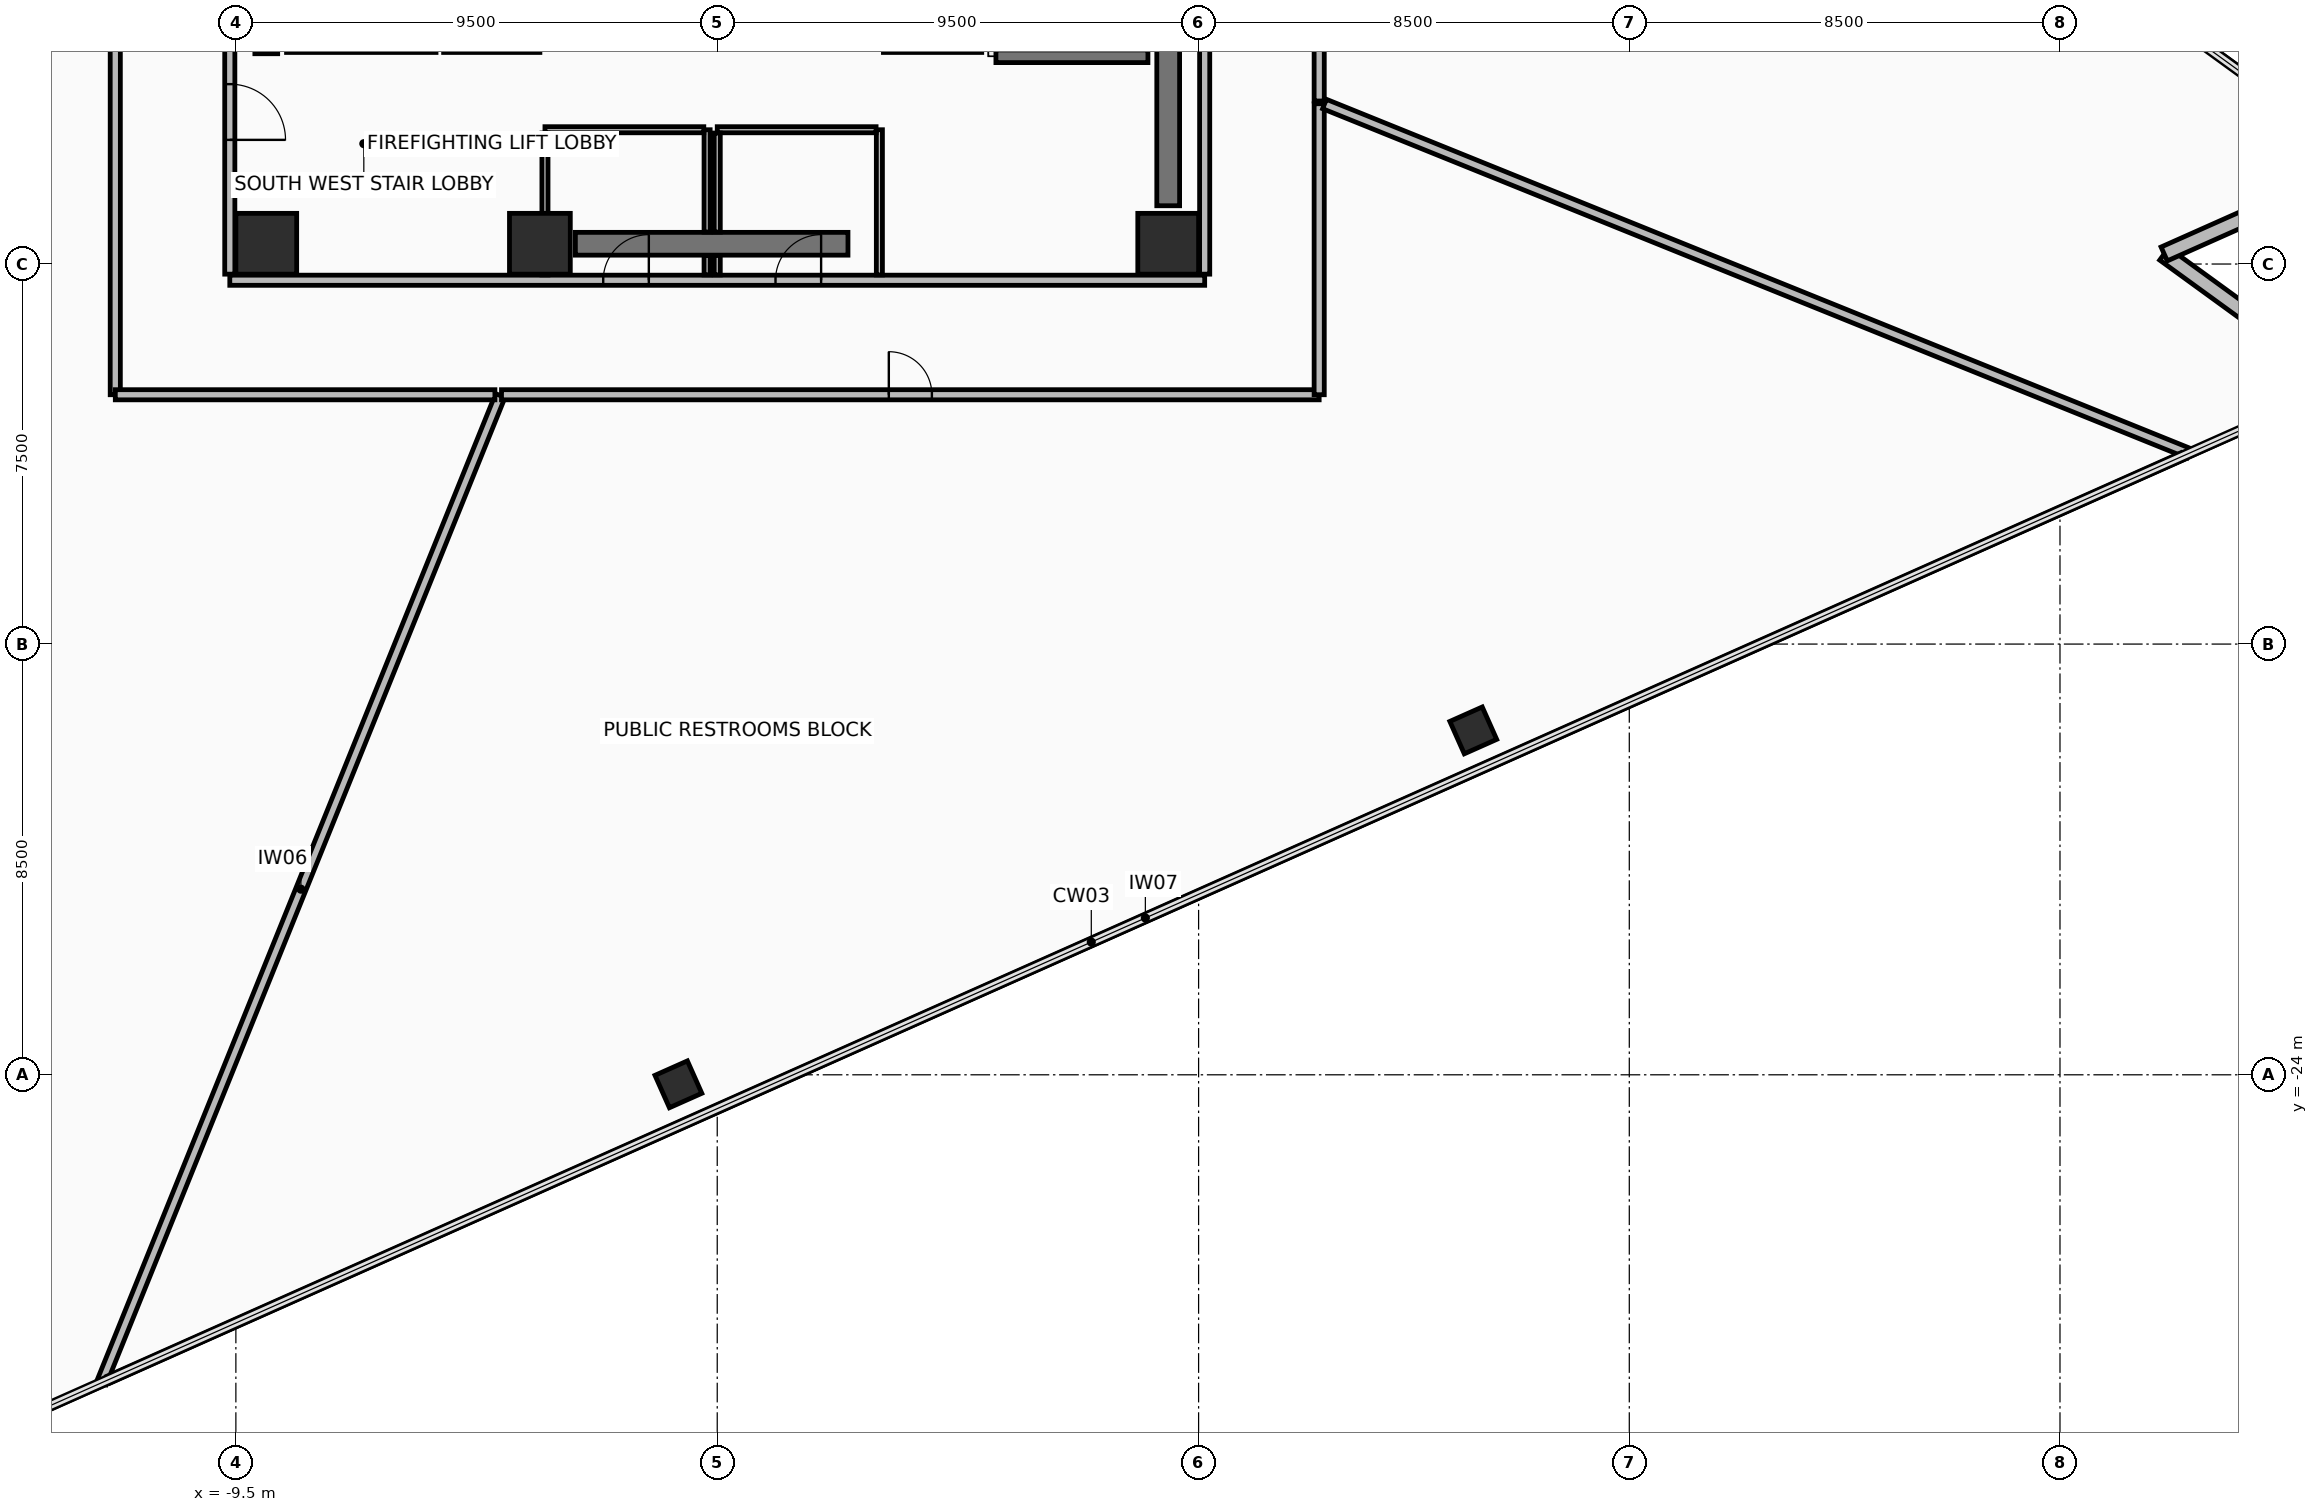
"""IFC4 building model, lengths in metres.
Left out: names, types, materials, properties, quantities, classifications, styles, units other than length and angle.
Written with IfcOpenShell. Run it as: python <this file> out.ifc"""

import sys

from ifc_helpers import new_model, si_unit, direction, frame, frame_2d, origin, origin_2d, place, context, subcontext, project, spatial, rectangle, hollow_rectangle, extrude, element, fill, save


model = new_model("IFC4")
c1 = context("Model", 3, precision=1e-05, world=origin(), true_north=direction((0.0, 1.0)))
c2 = subcontext(c1, "Body", "Model", "MODEL_VIEW")
j1 = project(units=[si_unit("LENGTHUNIT", "METRE"), si_unit("PLANEANGLEUNIT", "RADIAN")], contexts=[c1])
p1 = place(None, origin())
s1 = spatial("IfcSite", under=j1, at=p1, CompositionType="ELEMENT")
p2 = place(p1, origin())
s2 = spatial("IfcBuilding", under=s1, at=p2, CompositionType="ELEMENT")
p3 = place(p2, frame((0.0, 0.0, 134.05)))
s3 = spatial("IfcBuildingStorey", under=s2, at=p3, CompositionType="ELEMENT", Elevation=134.05)
for number, where, z_axis, x_axis in (
    (1, (-8.9, -7.6, 0.0), (0.0, 0.0, 1.0), (1.0, 0.0, 0.0)),
    (2, (-3.5, -7.6, 0.0), (0.0, 0.0, 1.0), (1.0, 0.0, 0.0)),
    (3, (8.9, -7.6, 0.0), (0.0, 0.0, 1.0), (1.0, 0.0, 0.0)),
):
    element("IfcColumn", number, at=place(p3, frame(where, z_axis=z_axis, x_axis=x_axis)), inside=s3, PredefinedType="COLUMN", context=c2, shape_type="SweptSolid", body=[
        extrude(rectangle(XDim=1.2, YDim=1.2, at=origin_2d()), origin(), (0.0, 0.0, 1.0), 4.75),
    ])
for number, where, z_axis, x_axis in (
    (4, (-0.766, -24.188, 0.0), (0.0, 0.0, 1.0), (0.914, 0.407, 0.0)),
    (5, (14.921, -17.204, 0.0), (0.0, 0.0, 1.0), (0.914, 0.407, 0.0)),
):
    element("IfcColumn", number, at=place(p3, frame(where, z_axis=z_axis, x_axis=x_axis)), inside=s3, PredefinedType="COLUMN", context=c2, shape_type="SweptSolid", body=[
        extrude(hollow_rectangle(XDim=0.7, YDim=0.7, WallThickness=0.04, at=origin_2d()), origin(), (0.0, 0.0, 1.0), 4.75),
    ])
for number, where, z_axis, x_axis in (
    (6, (32.1, -10.376, 0.0), (0.0, 0.0, 1.0), (-0.809, 0.588, 0.0)),
    (7, (28.556, -7.802, 0.0), (0.0, 0.0, 1.0), (0.914, 0.407, 0.0)),
):
    element("IfcWall", number, at=place(p3, frame(where, z_axis=z_axis, x_axis=x_axis)), inside=s3, PredefinedType="STANDARD", context=c2, shape_type="SweptSolid", body=[
        extrude(rectangle(XDim=4.38, YDim=0.3, at=frame_2d((2.19, 0.0))), origin(), (0.0, 0.0, 1.0), 2.255),
    ])
p4 = place(p3, frame((-2.8, -7.6, 0.0), z_axis=(0.0, 0.0, 1.0), x_axis=(1.0, 0.0, 0.0)))
e8 = element("IfcWall", 8, at=p4, inside=s3, PredefinedType="SHEAR", context=c2, shape_type="SweptSolid", body=[
    extrude(rectangle(XDim=5.38, YDim=0.45, at=frame_2d((2.69, 0.0))), origin(), (0.0, 0.0, 1.0), 4.56),
])
for number, where, z_axis, x_axis in (
    (9, (-8.9, -3.85, 0.0), (0.0, 0.0, 1.0), (0.0, 1.0, 0.0)),
    (10, (8.9, -6.85, 0.0), (0.0, 0.0, 1.0), (0.0, 1.0, 0.0)),
):
    element("IfcWall", number, at=place(p3, frame(where, z_axis=z_axis, x_axis=x_axis)), inside=s3, PredefinedType="SHEAR", context=c2, shape_type="SweptSolid", body=[
        extrude(rectangle(XDim=10.7, YDim=0.45, at=frame_2d((5.35, 0.0))), origin(), (0.0, 0.0, 1.0), 4.56),
    ])
p5 = place(p3, frame((-9.62, -8.32, 0.0), z_axis=(0.0, 0.0, 1.0), x_axis=(1.0, 0.0, 0.0)))
e11 = element("IfcWall", 11, at=p5, inside=s3, PredefinedType="PARTITIONING", context=c2, shape_type="SweptSolid", body=[
    extrude(rectangle(XDim=19.24, YDim=0.2, at=frame_2d((9.62, 0.0))), origin(), (0.0, 0.0, 1.0), 2.355),
])
p6 = place(p5, frame((7.37, 0.0, 0.0)))
e12 = element("IfcOpeningElement", 12, at=p6, cuts=e11, PredefinedType="OPENING", context=c2, shape_type="SweptSolid", body=[
    extrude(rectangle(XDim=0.9, YDim=2.1, at=frame_2d((0.45, 1.05))), frame((0.0, 0.11, 0.0), z_axis=(0.0, -1.0, 0.0), x_axis=(1.0, 0.0, 0.0)), (0.0, 0.0, 1.0), 0.22),
])
p7 = place(p5, frame((10.77, 0.0, 0.0)))
e13 = element("IfcOpeningElement", 13, at=p7, cuts=e11, PredefinedType="OPENING", context=c2, shape_type="SweptSolid", body=[
    extrude(rectangle(XDim=0.9, YDim=2.1, at=frame_2d((0.45, 1.05))), frame((0.0, 0.11, 0.0), z_axis=(0.0, -1.0, 0.0), x_axis=(1.0, 0.0, 0.0)), (0.0, 0.0, 1.0), 0.22),
])
p8 = place(p3, frame((-9.62, 8.2, 0.0), z_axis=(0.0, 0.0, 1.0), x_axis=(0.0, -1.0, 0.0)))
e14 = element("IfcWall", 14, at=p8, inside=s3, PredefinedType="PARTITIONING", context=c2, shape_type="SweptSolid", body=[
    extrude(rectangle(XDim=16.4, YDim=0.2, at=frame_2d((8.2, 0.0))), origin(), (0.0, 0.0, 1.0), 2.755),
])
p9 = place(p8, frame((12.65, 0.0, 0.0)))
e15 = element("IfcOpeningElement", 15, at=p9, cuts=e14, PredefinedType="OPENING", context=c2, shape_type="SweptSolid", body=[
    extrude(rectangle(XDim=1.1, YDim=2.15, at=frame_2d((0.55, 1.075))), frame((0.0, 0.11, 0.0), z_axis=(0.0, -1.0, 0.0), x_axis=(1.0, 0.0, 0.0)), (0.0, 0.0, 1.0), 0.22),
])
p10 = place(p3, frame((9.62, -8.2, 0.0), z_axis=(0.0, 0.0, 1.0), x_axis=(0.0, 1.0, 0.0)))
e16 = element("IfcWall", 16, at=p10, inside=s3, PredefinedType="PARTITIONING", context=c2, shape_type="SweptSolid", body=[
    extrude(rectangle(XDim=16.4, YDim=0.2, at=frame_2d((8.2, 0.0))), origin(), (0.0, 0.0, 1.0), 2.355),
])
p11 = place(p10, frame((12.65, 0.0, 0.0)))
e17 = element("IfcOpeningElement", 17, at=p11, cuts=e16, PredefinedType="OPENING", context=c2, shape_type="SweptSolid", body=[
    extrude(rectangle(XDim=1.1, YDim=2.15, at=frame_2d((0.55, 1.075))), frame((0.0, 0.11, 0.0), z_axis=(0.0, -1.0, 0.0), x_axis=(1.0, 0.0, 0.0)), (0.0, 0.0, 1.0), 0.22),
])
p12 = place(p3, frame((-8.5, -3.7, 0.0), z_axis=(0.0, 0.0, 1.0), x_axis=(1.0, 0.0, 0.0)))
e18 = element("IfcWall", 18, at=p12, inside=s3, PredefinedType="SHEAR", context=c2, shape_type="SweptSolid", body=[
    extrude(rectangle(XDim=2.95, YDim=0.25, at=frame_2d((1.475, 0.0))), origin(), (0.0, 0.0, 1.0), 4.56),
])
p13 = place(p12, frame((0.9, 0.0, 0.0)))
e19 = element("IfcOpeningElement", 19, at=p13, cuts=e18, PredefinedType="OPENING", context=c2, shape_type="SweptSolid", body=[
    extrude(rectangle(XDim=1.1, YDim=2.15, at=frame_2d((0.55, 1.075))), frame((0.0, 0.135, 0.0), z_axis=(0.0, -1.0, 0.0), x_axis=(1.0, 0.0, 0.0)), (0.0, 0.0, 1.0), 0.27),
])
p14 = place(p3, frame((5.5, -3.9, 0.0), z_axis=(0.0, 0.0, 1.0), x_axis=(1.0, 0.0, 0.0)))
e20 = element("IfcWall", 20, at=p14, inside=s3, PredefinedType="SHEAR", context=c2, shape_type="SweptSolid", body=[
    extrude(rectangle(XDim=3.0, YDim=0.25, at=frame_2d((1.5, 0.0))), origin(), (0.0, 0.0, 1.0), 4.56),
])
p15 = place(p3, frame((-5.4, -3.7, 0.0), z_axis=(0.0, 0.0, 1.0), x_axis=(1.0, 0.0, 0.0)))
e21 = element("IfcWall", 21, at=p15, inside=s3, PredefinedType="SHEAR", context=c2, shape_type="SweptSolid", body=[
    extrude(rectangle(XDim=1.9, YDim=0.25, at=frame_2d((0.95, 0.0))), origin(), (0.0, 0.0, 1.0), 4.56),
])
p16 = place(p15, frame((0.35, 0.0, 0.0)))
e22 = element("IfcOpeningElement", 22, at=p16, cuts=e21, PredefinedType="OPENING", context=c2, shape_type="SweptSolid", body=[
    extrude(rectangle(XDim=1.2, YDim=2.2, at=frame_2d((0.6, 1.1))), frame((0.0, 0.135, 0.0), z_axis=(0.0, -1.0, 0.0), x_axis=(1.0, 0.0, 0.0)), (0.0, 0.0, 1.0), 0.27),
])
p17 = place(p3, frame((3.28, -3.7, 0.0), z_axis=(0.0, 0.0, 1.0), x_axis=(1.0, 0.0, 0.0)))
e23 = element("IfcWall", 23, at=p17, inside=s3, PredefinedType="SHEAR", context=c2, shape_type="SweptSolid", body=[
    extrude(rectangle(XDim=1.94, YDim=0.25, at=frame_2d((0.97, 0.0))), origin(), (0.0, 0.0, 1.0), 4.56),
])
p18 = place(p17, frame((0.42, 0.0, 0.0)))
e24 = element("IfcOpeningElement", 24, at=p18, cuts=e23, PredefinedType="OPENING", context=c2, shape_type="SweptSolid", body=[
    extrude(rectangle(XDim=1.1, YDim=2.2, at=frame_2d((0.55, 1.1))), frame((0.0, 0.135, 0.0), z_axis=(0.0, -1.0, 0.0), x_axis=(1.0, 0.0, 0.0)), (0.0, 0.0, 1.0), 0.27),
])
p19 = place(p3, frame((-0.2, -8.215, 0.0), z_axis=(0.0, 0.0, 1.0), x_axis=(0.0, 1.0, 0.0)))
e25 = element("IfcWall", 25, at=p19, inside=s3, PredefinedType="PARTITIONING", context=c2, shape_type="SweptSolid", body=[
    extrude(rectangle(XDim=0.385, YDim=0.12, at=frame_2d((0.192, 0.0))), origin(), (0.0, 0.0, 1.0), 3.755),
])
p20 = place(p3, frame((-0.2, -7.37, 0.0), z_axis=(0.0, 0.0, 1.0), x_axis=(0.0, 1.0, 0.0)))
e26 = element("IfcWall", 26, at=p20, inside=s3, PredefinedType="PARTITIONING", context=c2, shape_type="SweptSolid", body=[
    extrude(rectangle(XDim=2.02, YDim=0.12, at=frame_2d((1.01, 0.0))), origin(), (0.0, 0.0, 1.0), 3.755),
])
p21 = place(p3, frame((-0.265, -5.35, 0.0), z_axis=(0.0, 0.0, 1.0), x_axis=(-1.0, 0.0, 0.0)))
e27 = element("IfcWall", 27, at=p21, inside=s3, PredefinedType="PARTITIONING", context=c2, shape_type="SweptSolid", body=[
    extrude(rectangle(XDim=3.135, YDim=0.12, at=frame_2d((1.567, 0.0))), origin(), (0.0, 0.0, 1.0), 3.755),
])
p22 = place(p3, frame((-3.4, -5.415, 0.0), z_axis=(0.0, 0.0, 1.0), x_axis=(0.0, -1.0, 0.0)))
e28 = element("IfcWall", 28, at=p22, inside=s3, PredefinedType="PARTITIONING", context=c2, shape_type="SweptSolid", body=[
    extrude(rectangle(XDim=2.8, YDim=0.12, at=frame_2d((1.4, 0.0))), origin(), (0.0, 0.0, 1.0), 2.355),
])
p23 = place(p3, frame((3.2, -8.215, 0.0), z_axis=(0.0, 0.0, 1.0), x_axis=(0.0, 1.0, 0.0)))
e29 = element("IfcWall", 29, at=p23, inside=s3, PredefinedType="PARTITIONING", context=c2, shape_type="SweptSolid", body=[
    extrude(rectangle(XDim=2.865, YDim=0.12, at=frame_2d((1.433, 0.0))), origin(), (0.0, 0.0, 1.0), 3.755),
])
p24 = place(p3, frame((3.135, -5.35, 0.0), z_axis=(0.0, 0.0, 1.0), x_axis=(-1.0, 0.0, 0.0)))
e30 = element("IfcWall", 30, at=p24, inside=s3, PredefinedType="PARTITIONING", context=c2, shape_type="SweptSolid", body=[
    extrude(rectangle(XDim=3.135, YDim=0.12, at=frame_2d((1.567, 0.0))), origin(), (0.0, 0.0, 1.0), 4.56),
])
p25 = place(p3, frame((0.0, -5.415, 0.0), z_axis=(0.0, 0.0, 1.0), x_axis=(0.0, -1.0, 0.0)))
e31 = element("IfcWall", 31, at=p25, inside=s3, PredefinedType="PARTITIONING", context=c2, shape_type="SweptSolid", body=[
    extrude(rectangle(XDim=1.955, YDim=0.12, at=frame_2d((0.978, 0.0))), origin(), (0.0, 0.0, 1.0), 3.755),
])
p26 = place(p3, frame((0.0, -7.83, 0.0), z_axis=(0.0, 0.0, 1.0), x_axis=(0.0, -1.0, 0.0)))
e32 = element("IfcWall", 32, at=p26, inside=s3, PredefinedType="PARTITIONING", context=c2, shape_type="SweptSolid", body=[
    extrude(rectangle(XDim=0.385, YDim=0.12, at=frame_2d((0.192, 0.0))), origin(), (0.0, 0.0, 1.0), 3.755),
])
p27 = place(p3, frame((-12.152, -30.078, 0.0), z_axis=(0.0, 0.0, 1.0), x_axis=(0.374599633096, 0.927186666688, 0.0)))
e33 = element("IfcWall", 33, at=p27, inside=s3, PredefinedType="PARTITIONING", context=c2, shape_type="SweptSolid", body=[
    extrude(rectangle(XDim=21.013, YDim=0.2, at=frame_2d((10.506, 0.0))), origin(), (0.0, 0.0, 1.0), 2.255),
])
p28 = place(p3, frame((-4.258, -10.58, 0.0), z_axis=(0.0, 0.0, 1.0), x_axis=(1.0, 0.0, 0.0)))
e34 = element("IfcWall", 34, at=p28, inside=s3, PredefinedType="PARTITIONING", context=c2, shape_type="SweptSolid", body=[
    extrude(rectangle(XDim=16.137, YDim=0.2, at=frame_2d((8.069, 0.0))), origin(), (0.0, 0.0, 1.0), 2.355),
])
p29 = place(p28, frame((7.644, 0.0, 0.0)))
e35 = element("IfcOpeningElement", 35, at=p29, cuts=e34, PredefinedType="OPENING", context=c2, shape_type="SweptSolid", body=[
    extrude(rectangle(XDim=0.85, YDim=2.1, at=frame_2d((0.425, 1.05))), frame((0.0, 0.11, 0.0), z_axis=(0.0, -1.0, 0.0), x_axis=(1.0, 0.0, 0.0)), (0.0, 0.0, 1.0), 0.22),
])
p30 = place(p3, frame((11.88, -10.579, 0.0), z_axis=(0.0, 0.0, 1.0), x_axis=(0.0, 1.0, 0.0)))
e36 = element("IfcWall", 36, at=p30, inside=s3, PredefinedType="PARTITIONING", context=c2, shape_type="SweptSolid", body=[
    extrude(rectangle(XDim=5.742, YDim=0.2, at=frame_2d((2.871, 0.0))), origin(), (0.0, 0.0, 1.0), 2.355),
])
p31 = place(p3, frame((11.985, -4.842, 0.0), z_axis=(0.0, 0.0, 1.0), x_axis=(0.927179986841, -0.37461616623, 0.0)))
e37 = element("IfcWall", 37, at=p31, inside=s3, PredefinedType="PARTITIONING", context=c2, shape_type="SweptSolid", body=[
    extrude(rectangle(XDim=18.401, YDim=0.2, at=frame_2d((9.2, 0.0))), origin(), (0.0, 0.0, 1.0), 2.255),
])
p32 = place(p3, frame((28.913, -11.795, 0.0), z_axis=(0.0, 0.0, 1.0), x_axis=(-0.913545956469, -0.406735522692, 0.0)))
e38 = element("IfcWall", 38, at=p32, inside=s3, PredefinedType="PARTITIONING", context=c2, shape_type="SweptSolid", body=[
    extrude(rectangle(XDim=44.801, YDim=0.15, at=frame_2d((22.4, 0.0))), origin(), (0.0, 0.0, 1.0), 2.355),
])
p33 = place(p3, frame((-11.88, 4.783, 0.0), z_axis=(0.0, 0.0, 1.0), x_axis=(0.0, -1.0, 0.0)))
e39 = element("IfcWall", 39, at=p33, inside=s3, PredefinedType="PARTITIONING", context=c2, shape_type="SweptSolid", body=[
    extrude(rectangle(XDim=15.362, YDim=0.2, at=frame_2d((7.681, 0.0))), origin(), (0.0, 0.0, 1.0), 2.755),
])
p34 = place(p33, frame((7.181, 0.0, 0.0)))
e40 = element("IfcOpeningElement", 40, at=p34, cuts=e39, PredefinedType="OPENING", context=c2, shape_type="SweptSolid", body=[
    extrude(rectangle(XDim=1.0, YDim=2.15, at=frame_2d((0.5, 1.075))), frame((0.0, 0.11, 0.0), z_axis=(0.0, -1.0, 0.0), x_axis=(1.0, 0.0, 0.0)), (0.0, 0.0, 1.0), 0.22),
])
p35 = place(p3, frame((-11.879, -10.58, 0.0), z_axis=(0.0, 0.0, 1.0), x_axis=(1.0, 0.0, 0.0)))
e41 = element("IfcWall", 41, at=p35, inside=s3, PredefinedType="PARTITIONING", context=c2, shape_type="SweptSolid", body=[
    extrude(rectangle(XDim=7.492, YDim=0.2, at=frame_2d((3.746, 0.0))), origin(), (0.0, 0.0, 1.0), 2.355),
])
p36 = place(p3, frame((11.88, -4.783, 0.0), z_axis=(0.0, 0.0, 1.0), x_axis=(0.0, 1.0, 0.0)))
e42 = element("IfcWall", 42, at=p36, inside=s3, PredefinedType="PARTITIONING", context=c2, shape_type="SweptSolid", body=[
    extrude(rectangle(XDim=13.786, YDim=0.2, at=frame_2d((6.893, 0.0))), origin(), (0.0, 0.0, 1.0), 2.255),
])
p37 = place(p36, frame((6.443, 0.0, 0.0)))
e43 = element("IfcOpeningElement", 43, at=p37, cuts=e42, PredefinedType="OPENING", context=c2, shape_type="SweptSolid", body=[
    extrude(rectangle(XDim=0.9, YDim=2.1, at=frame_2d((0.45, 1.05))), frame((0.0, 0.11, 0.0), z_axis=(0.0, -1.0, 0.0), x_axis=(1.0, 0.0, 0.0)), (0.0, 0.0, 1.0), 0.22),
])
p38 = place(p9, frame((1.1, 0.0, 0.0), z_axis=(0.0, 0.0, 1.0), x_axis=(-1.0, 0.0, 0.0)))
e44 = element("IfcDoor", 44, at=p38, inside=s3, OperationType="SINGLE_SWING_LEFT", PredefinedType="DOOR", context=c2, shape_type="SweptSolid", body=[
    extrude(rectangle(XDim=1.1, YDim=2.15, at=frame_2d((0.55, 1.075))), frame((0.0, 0.025, 0.0), z_axis=(0.0, -1.0, 0.0), x_axis=(1.0, 0.0, 0.0)), (0.0, 0.0, 1.0), 0.05),
])
fill(e15, e44)
p39 = place(p6, frame((0.9, 0.0, 0.0), z_axis=(0.0, 0.0, 1.0), x_axis=(-1.0, 0.0, 0.0)))
e45 = element("IfcDoor", 45, at=p39, inside=s3, OperationType="SINGLE_SWING_LEFT", PredefinedType="DOOR", context=c2, shape_type="SweptSolid", body=[
    extrude(rectangle(XDim=0.9, YDim=2.1, at=frame_2d((0.45, 1.05))), frame((0.0, 0.025, 0.0), z_axis=(0.0, -1.0, 0.0), x_axis=(1.0, 0.0, 0.0)), (0.0, 0.0, 1.0), 0.05),
])
fill(e12, e45)
p40 = place(p7, frame((0.9, 0.0, 0.0), z_axis=(0.0, 0.0, 1.0), x_axis=(-1.0, 0.0, 0.0)))
e46 = element("IfcDoor", 46, at=p40, inside=s3, OperationType="SINGLE_SWING_LEFT", PredefinedType="DOOR", context=c2, shape_type="SweptSolid", body=[
    extrude(rectangle(XDim=0.9, YDim=2.1, at=frame_2d((0.45, 1.05))), frame((0.0, 0.025, 0.0), z_axis=(0.0, -1.0, 0.0), x_axis=(1.0, 0.0, 0.0)), (0.0, 0.0, 1.0), 0.05),
])
fill(e13, e46)
p41 = place(p29, origin())
e47 = element("IfcDoor", 47, at=p41, inside=s3, OperationType="SINGLE_SWING_RIGHT", PredefinedType="DOOR", context=c2, shape_type="SweptSolid", body=[
    extrude(rectangle(XDim=0.85, YDim=2.1, at=frame_2d((0.425, 1.05))), frame((0.0, 0.025, 0.0), z_axis=(0.0, -1.0, 0.0), x_axis=(1.0, 0.0, 0.0)), (0.0, 0.0, 1.0), 0.05),
])
fill(e35, e47)
save(model, sys.argv[1])
